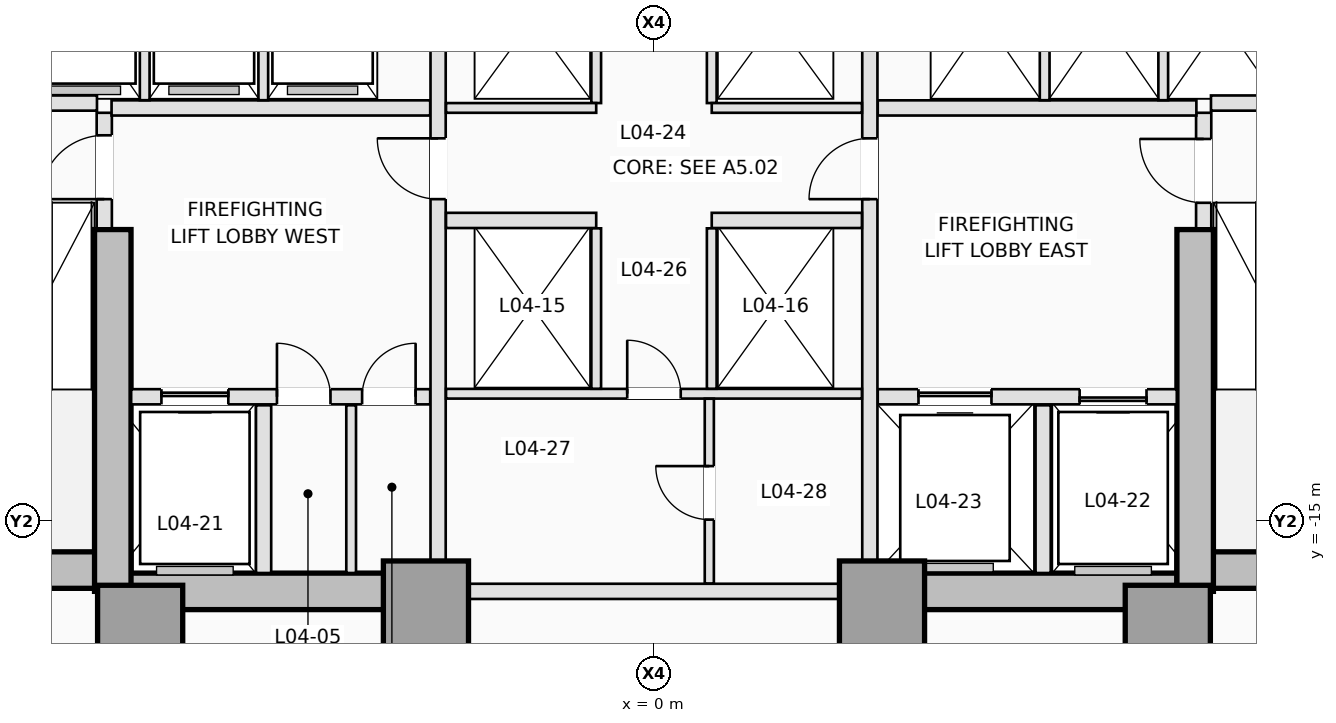
"""IFC4 building model, lengths in metres.
Left out: names, types, materials, properties, quantities, classifications, styles, units other than length and angle.
Written with IfcOpenShell. Run it as: python <this file> out.ifc"""

import sys

from ifc_helpers import new_model, si_unit, direction, frame, frame_2d, origin, origin_2d, place, context, subcontext, project, spatial, rectangle, extrude, element, fill, save


model = new_model("IFC4")
c1 = context("Model", 3, precision=1e-05, world=origin(), true_north=direction((0.0, 1.0)))
c2 = subcontext(c1, "Body", "Model", "MODEL_VIEW")
j1 = project(units=[si_unit("LENGTHUNIT", "METRE"), si_unit("PLANEANGLEUNIT", "RADIAN")], contexts=[c1])
p1 = place(None, origin())
s1 = spatial("IfcSite", under=j1, at=p1, CompositionType="ELEMENT")
p2 = place(p1, origin())
s2 = spatial("IfcBuilding", under=s1, at=p2, CompositionType="ELEMENT")
p3 = place(p2, frame((0.0, 0.0, 18.5)))
s3 = spatial("IfcBuildingStorey", under=s2, at=p3, CompositionType="ELEMENT", Elevation=18.5)
p4 = place(p3, frame((-12.8, -15.8, 0.0), z_axis=(0.0, 0.0, 1.0), x_axis=(1.0, 0.0, 0.0)))
e1 = element("IfcWall", 1, at=p4, inside=s3, PredefinedType="SHEAR", context=c2, shape_type="SweptSolid", body=[
    extrude(rectangle(XDim=4.2, YDim=0.6, at=frame_2d((2.1, 0.0))), origin(), (0.0, 0.0, 1.0), 4.5),
])
for number, where, z_axis, x_axis in (
    (2, (-8.9, -16.15, 0.0), (0.0, 0.0, 1.0), (1.0, 0.0, 0.0)),
    (3, (3.75, -16.15, 0.0), (0.0, 0.0, 1.0), (1.0, 0.0, 0.0)),
):
    element("IfcWall", number, at=place(p3, frame(where, z_axis=z_axis, x_axis=x_axis)), inside=s3, PredefinedType="SHEAR", context=c2, shape_type="SweptSolid", body=[
        extrude(rectangle(XDim=5.15, YDim=0.6, at=frame_2d((2.575, 0.0))), origin(), (0.0, 0.0, 1.0), 4.5),
    ])
p5 = place(p3, frame((8.6, -15.8, 0.0), z_axis=(0.0, 0.0, 1.0), x_axis=(1.0, 0.0, 0.0)))
e4 = element("IfcWall", 4, at=p5, inside=s3, PredefinedType="SHEAR", context=c2, shape_type="SweptSolid", body=[
    extrude(rectangle(XDim=4.2, YDim=0.6, at=frame_2d((2.1, 0.0))), origin(), (0.0, 0.0, 1.0), 4.5),
])
for number, where, z_axis, x_axis in (
    (5, (-8.9, -16.15, 0.0), (0.0, 0.0, 1.0), (0.0, 1.0, 0.0)),
    (6, (8.9, -16.15, 0.0), (0.0, 0.0, 1.0), (0.0, 1.0, 0.0)),
):
    element("IfcWall", number, at=place(p3, frame(where, z_axis=z_axis, x_axis=x_axis)), inside=s3, PredefinedType="SHEAR", context=c2, shape_type="SweptSolid", body=[
        extrude(rectangle(XDim=5.95, YDim=0.6, at=frame_2d((2.975, 0.0))), origin(), (0.0, 0.0, 1.0), 4.5),
    ])
for number, where, z_axis, x_axis in (
    (7, (-8.45, -16.75, 0.0), (0.0, 0.0, 1.0), (1.0, 0.0, 0.0)),
    (8, (-3.75, -16.35, 0.0), (0.0, 0.0, 1.0), (1.0, 0.0, 0.0)),
    (9, (3.75, -16.35, 0.0), (0.0, 0.0, 1.0), (1.0, 0.0, 0.0)),
    (10, (8.45, -16.75, 0.0), (0.0, 0.0, 1.0), (1.0, 0.0, 0.0)),
):
    element("IfcColumn", number, at=place(p3, frame(where, z_axis=z_axis, x_axis=x_axis)), inside=s3, PredefinedType="COLUMN", context=c2, shape_type="SweptSolid", body=[
        extrude(rectangle(XDim=1.4, YDim=1.4, at=origin_2d()), origin(), (0.0, 0.0, 1.0), 4.5),
    ])
p6 = place(p3, frame((-9.04, -10.18, 0.0), z_axis=(0.0, 0.0, 1.0), x_axis=(0.0, 1.0, 0.0)))
e11 = element("IfcWall", 11, at=p6, inside=s3, PredefinedType="PARTITIONING", context=c2, shape_type="SweptSolid", body=[
    extrude(rectangle(XDim=1.9, YDim=0.25, at=frame_2d((0.95, 0.0))), origin(), (0.0, 0.0, 1.0), 4.08),
])
p7 = place(p6, frame((0.48, 0.0, 0.0)))
e12 = element("IfcOpeningElement", 12, at=p7, cuts=e11, PredefinedType="OPENING", context=c2, shape_type="SweptSolid", body=[
    extrude(rectangle(XDim=1.05, YDim=2.15, at=frame_2d((0.525, 1.075))), frame((0.0, 0.135, 0.0), z_axis=(0.0, -1.0, 0.0), x_axis=(1.0, 0.0, 0.0)), (0.0, 0.0, 1.0), 0.27),
])
p8 = place(p3, frame((9.04, -10.18, 0.0), z_axis=(0.0, 0.0, 1.0), x_axis=(0.0, 1.0, 0.0)))
e13 = element("IfcWall", 13, at=p8, inside=s3, PredefinedType="PARTITIONING", context=c2, shape_type="SweptSolid", body=[
    extrude(rectangle(XDim=1.9, YDim=0.25, at=frame_2d((0.95, 0.0))), origin(), (0.0, 0.0, 1.0), 4.08),
])
p9 = place(p8, frame((0.42, 0.0, 0.0)))
e14 = element("IfcOpeningElement", 14, at=p9, cuts=e13, PredefinedType="OPENING", context=c2, shape_type="SweptSolid", body=[
    extrude(rectangle(XDim=1.05, YDim=2.15, at=frame_2d((0.525, 1.075))), frame((0.0, 0.135, 0.0), z_axis=(0.0, -1.0, 0.0), x_axis=(1.0, 0.0, 0.0)), (0.0, 0.0, 1.0), 0.27),
])
for number, where, z_axis, x_axis in (
    (15, (-12.38, -8.12, 0.0), (0.0, 0.0, 1.0), (1.0, 0.0, 0.0)),
    (16, (9.16, -8.12, 0.0), (0.0, 0.0, 1.0), (1.0, 0.0, 0.0)),
):
    element("IfcWall", number, at=place(p3, frame(where, z_axis=z_axis, x_axis=x_axis)), inside=s3, PredefinedType="PARTITIONING", context=c2, shape_type="SweptSolid", body=[
        extrude(rectangle(XDim=3.22, YDim=0.25, at=frame_2d((1.61, 0.0))), origin(), (0.0, 0.0, 1.0), 4.08),
    ])
p10 = place(p3, frame((-8.598, -12.95, 0.0), z_axis=(0.0, 0.0, 1.0), x_axis=(1.0, 0.0, 0.0)))
e17 = element("IfcWall", 17, at=p10, inside=s3, PredefinedType="PARTITIONING", context=c2, shape_type="SweptSolid", body=[
    extrude(rectangle(XDim=4.918, YDim=0.25, at=frame_2d((2.459, 0.0))), origin(), (0.0, 0.0, 1.0), 4.08),
])
p11 = place(p10, frame((0.498, 0.0, 0.0)))
e18 = element("IfcOpeningElement", 18, at=p11, cuts=e17, PredefinedType="OPENING", context=c2, shape_type="SweptSolid", body=[
    extrude(rectangle(XDim=1.1, YDim=2.15, at=frame_2d((0.55, 1.075))), frame((0.0, 0.135, 0.0), z_axis=(0.0, -1.0, 0.0), x_axis=(1.0, 0.0, 0.0)), (0.0, 0.0, 1.0), 0.27),
])
p12 = place(p10, frame((2.398, 0.0, 0.0)))
e19 = element("IfcOpeningElement", 19, at=p12, cuts=e17, PredefinedType="OPENING", context=c2, shape_type="SweptSolid", body=[
    extrude(rectangle(XDim=0.88, YDim=2.1, at=frame_2d((0.44, 1.05))), frame((0.0, 0.135, 0.0), z_axis=(0.0, -1.0, 0.0), x_axis=(1.0, 0.0, 0.0)), (0.0, 0.0, 1.0), 0.27),
])
p13 = place(p10, frame((3.798, 0.0, 0.0)))
e20 = element("IfcOpeningElement", 20, at=p13, cuts=e17, PredefinedType="OPENING", context=c2, shape_type="SweptSolid", body=[
    extrude(rectangle(XDim=0.88, YDim=2.1, at=frame_2d((0.44, 1.05))), frame((0.0, 0.135, 0.0), z_axis=(0.0, -1.0, 0.0), x_axis=(1.0, 0.0, 0.0)), (0.0, 0.0, 1.0), 0.27),
])
p14 = place(p3, frame((3.68, -12.95, 0.0), z_axis=(0.0, 0.0, 1.0), x_axis=(1.0, 0.0, 0.0)))
e21 = element("IfcWall", 21, at=p14, inside=s3, PredefinedType="PARTITIONING", context=c2, shape_type="SweptSolid", body=[
    extrude(rectangle(XDim=4.918, YDim=0.25, at=frame_2d((2.459, 0.0))), origin(), (0.0, 0.0, 1.0), 4.08),
])
p15 = place(p14, frame((3.32, 0.0, 0.0)))
e22 = element("IfcOpeningElement", 22, at=p15, cuts=e21, PredefinedType="OPENING", context=c2, shape_type="SweptSolid", body=[
    extrude(rectangle(XDim=1.1, YDim=2.15, at=frame_2d((0.55, 1.075))), frame((0.0, 0.135, 0.0), z_axis=(0.0, -1.0, 0.0), x_axis=(1.0, 0.0, 0.0)), (0.0, 0.0, 1.0), 0.27),
])
p16 = place(p14, frame((0.67, 0.0, 0.0)))
e23 = element("IfcOpeningElement", 23, at=p16, cuts=e21, PredefinedType="OPENING", context=c2, shape_type="SweptSolid", body=[
    extrude(rectangle(XDim=1.2, YDim=2.15, at=frame_2d((0.6, 1.075))), frame((0.0, 0.135, 0.0), z_axis=(0.0, -1.0, 0.0), x_axis=(1.0, 0.0, 0.0)), (0.0, 0.0, 1.0), 0.27),
])
p17 = place(p3, frame((-6.42, -15.848, 0.0), z_axis=(0.0, 0.0, 1.0), x_axis=(0.0, 1.0, 0.0)))
e24 = element("IfcWall", 24, at=p17, inside=s3, PredefinedType="PARTITIONING", context=c2, shape_type="SweptSolid", body=[
    extrude(rectangle(XDim=2.758, YDim=0.25, at=frame_2d((1.379, 0.0))), origin(), (0.0, 0.0, 1.0), 4.08),
])
p18 = place(p3, frame((-4.98, -15.848, 0.0), z_axis=(0.0, 0.0, 1.0), x_axis=(0.0, 1.0, 0.0)))
e25 = element("IfcWall", 25, at=p18, inside=s3, PredefinedType="PARTITIONING", context=c2, shape_type="SweptSolid", body=[
    extrude(rectangle(XDim=2.758, YDim=0.16, at=frame_2d((1.379, 0.0))), origin(), (0.0, 0.0, 1.0), 4.08),
])
p19 = place(p3, frame((6.4, -15.848, 0.0), z_axis=(0.0, 0.0, 1.0), x_axis=(0.0, 1.0, 0.0)))
e26 = element("IfcWall", 26, at=p19, inside=s3, PredefinedType="PARTITIONING", context=c2, shape_type="SweptSolid", body=[
    extrude(rectangle(XDim=2.758, YDim=0.25, at=frame_2d((1.379, 0.0))), origin(), (0.0, 0.0, 1.0), 4.08),
])
for number, where, z_axis, x_axis in (
    (27, (-8.92, -8.2, 0.0), (0.0, 0.0, 1.0), (1.0, 0.0, 0.0)),
    (28, (3.68, -8.2, 0.0), (0.0, 0.0, 1.0), (1.0, 0.0, 0.0)),
):
    element("IfcWall", number, at=place(p3, frame(where, z_axis=z_axis, x_axis=x_axis)), inside=s3, PredefinedType="PARTITIONING", context=c2, shape_type="SweptSolid", body=[
        extrude(rectangle(XDim=5.24, YDim=0.25, at=frame_2d((2.62, 0.0))), origin(), (0.0, 0.0, 1.0), 4.08),
    ])
p20 = place(p3, frame((-3.55, -15.648, 0.0), z_axis=(0.0, 0.0, 1.0), x_axis=(0.0, 1.0, 0.0)))
e29 = element("IfcWall", 29, at=p20, inside=s3, PredefinedType="PARTITIONING", context=c2, shape_type="SweptSolid", body=[
    extrude(rectangle(XDim=10.146, YDim=0.25, at=frame_2d((5.073, 0.0))), origin(), (0.0, 0.0, 1.0), 4.08),
])
p21 = place(p20, frame((5.948, 0.0, 0.0)))
e30 = element("IfcOpeningElement", 30, at=p21, cuts=e29, PredefinedType="OPENING", context=c2, shape_type="SweptSolid", body=[
    extrude(rectangle(XDim=1.0, YDim=2.15, at=frame_2d((0.5, 1.075))), frame((0.0, 0.135, 0.0), z_axis=(0.0, -1.0, 0.0), x_axis=(1.0, 0.0, 0.0)), (0.0, 0.0, 1.0), 0.27),
])
p22 = place(p3, frame((3.55, -15.648, 0.0), z_axis=(0.0, 0.0, 1.0), x_axis=(0.0, 1.0, 0.0)))
e31 = element("IfcWall", 31, at=p22, inside=s3, PredefinedType="PARTITIONING", context=c2, shape_type="SweptSolid", body=[
    extrude(rectangle(XDim=10.146, YDim=0.25, at=frame_2d((5.073, 0.0))), origin(), (0.0, 0.0, 1.0), 4.08),
])
p23 = place(p22, frame((5.948, 0.0, 0.0)))
e32 = element("IfcOpeningElement", 32, at=p23, cuts=e31, PredefinedType="OPENING", context=c2, shape_type="SweptSolid", body=[
    extrude(rectangle(XDim=1.0, YDim=2.15, at=frame_2d((0.5, 1.075))), frame((0.0, 0.135, 0.0), z_axis=(0.0, -1.0, 0.0), x_axis=(1.0, 0.0, 0.0)), (0.0, 0.0, 1.0), 0.27),
])
for number, where, z_axis, x_axis in (
    (33, (-8.375, -8.073, 0.0), (0.0, 0.0, 1.0), (0.0, 1.0, 0.0)),
    (34, (-6.425, -8.073, 0.0), (0.0, 0.0, 1.0), (0.0, 1.0, 0.0)),
    (35, (6.425, -8.073, 0.0), (0.0, 0.0, 1.0), (0.0, 1.0, 0.0)),
    (36, (8.375, -8.073, 0.0), (0.0, 0.0, 1.0), (0.0, 1.0, 0.0)),
):
    element("IfcWall", number, at=place(p3, frame(where, z_axis=z_axis, x_axis=x_axis)), inside=s3, PredefinedType="PARTITIONING", context=c2, shape_type="SweptSolid", body=[
        extrude(rectangle(XDim=2.733, YDim=0.16, at=frame_2d((1.366, 0.0))), origin(), (0.0, 0.0, 1.0), 4.08),
    ])
p24 = place(p3, frame((-3.048, -16.15, 0.0), z_axis=(0.0, 0.0, 1.0), x_axis=(1.0, 0.0, 0.0)))
e37 = element("IfcWall", 37, at=p24, inside=s3, PredefinedType="PARTITIONING", context=c2, shape_type="SweptSolid", body=[
    extrude(rectangle(XDim=6.096, YDim=0.25, at=frame_2d((3.048, 0.0))), origin(), (0.0, 0.0, 1.0), 3.056),
])
for number, where, z_axis, x_axis in (
    (38, (-0.95, -8.12, 0.0), (0.0, 0.0, 1.0), (0.0, 1.0, 0.0)),
    (39, (0.95, -8.12, 0.0), (0.0, 0.0, 1.0), (0.0, 1.0, 0.0)),
):
    element("IfcWall", number, at=place(p3, frame(where, z_axis=z_axis, x_axis=x_axis)), inside=s3, PredefinedType="PARTITIONING", context=c2, shape_type="SweptSolid", body=[
        extrude(rectangle(XDim=2.78, YDim=0.16, at=frame_2d((1.39, 0.0))), origin(), (0.0, 0.0, 1.0), 4.08),
    ])
for number, where, z_axis, x_axis in (
    (40, (-3.42, -8.2, 0.0), (0.0, 0.0, 1.0), (1.0, 0.0, 0.0)),
    (41, (0.95, -8.2, 0.0), (0.0, 0.0, 1.0), (1.0, 0.0, 0.0)),
):
    element("IfcWall", number, at=place(p3, frame(where, z_axis=z_axis, x_axis=x_axis)), inside=s3, PredefinedType="PARTITIONING", context=c2, shape_type="SweptSolid", body=[
        extrude(rectangle(XDim=2.47, YDim=0.16, at=frame_2d((1.235, 0.0))), origin(), (0.0, 0.0, 1.0), 4.08),
    ])
for number, where, z_axis, x_axis in (
    (42, (-3.42, -10.05, 0.0), (0.0, 0.0, 1.0), (1.0, 0.0, 0.0)),
    (43, (0.95, -10.05, 0.0), (0.0, 0.0, 1.0), (1.0, 0.0, 0.0)),
):
    element("IfcWall", number, at=place(p3, frame(where, z_axis=z_axis, x_axis=x_axis)), inside=s3, PredefinedType="PARTITIONING", context=c2, shape_type="SweptSolid", body=[
        extrude(rectangle(XDim=2.47, YDim=0.25, at=frame_2d((1.235, 0.0))), origin(), (0.0, 0.0, 1.0), 4.08),
    ])
p25 = place(p3, frame((-3.42, -12.9, 0.0), z_axis=(0.0, 0.0, 1.0), x_axis=(1.0, 0.0, 0.0)))
e44 = element("IfcWall", 44, at=p25, inside=s3, PredefinedType="PARTITIONING", context=c2, shape_type="SweptSolid", body=[
    extrude(rectangle(XDim=6.84, YDim=0.16, at=frame_2d((3.42, 0.0))), origin(), (0.0, 0.0, 1.0), 4.08),
])
p26 = place(p25, frame((2.98, 0.0, 0.0)))
e45 = element("IfcOpeningElement", 45, at=p26, cuts=e44, PredefinedType="OPENING", context=c2, shape_type="SweptSolid", body=[
    extrude(rectangle(XDim=0.88, YDim=2.12, at=frame_2d((0.44, 1.06))), frame((0.0, 0.09, 0.0), z_axis=(0.0, -1.0, 0.0), x_axis=(1.0, 0.0, 0.0)), (0.0, 0.0, 1.0), 0.18),
])
for number, where, z_axis, x_axis in (
    (46, (-0.95, -12.818, 0.0), (0.0, 0.0, 1.0), (0.0, 1.0, 0.0)),
    (47, (0.95, -12.818, 0.0), (0.0, 0.0, 1.0), (0.0, 1.0, 0.0)),
):
    element("IfcWall", number, at=place(p3, frame(where, z_axis=z_axis, x_axis=x_axis)), inside=s3, PredefinedType="PARTITIONING", context=c2, shape_type="SweptSolid", body=[
        extrude(rectangle(XDim=2.638, YDim=0.16, at=frame_2d((1.319, 0.0))), origin(), (0.0, 0.0, 1.0), 4.08),
    ])
p27 = place(p3, frame((0.91, -16.02, 0.0), z_axis=(0.0, 0.0, 1.0), x_axis=(0.0, 1.0, 0.0)))
e48 = element("IfcWall", 48, at=p27, inside=s3, PredefinedType="PARTITIONING", context=c2, shape_type="SweptSolid", body=[
    extrude(rectangle(XDim=3.038, YDim=0.15, at=frame_2d((1.519, 0.0))), origin(), (0.0, 0.0, 1.0), 4.08),
])
p28 = place(p27, frame((1.05, 0.0, 0.0)))
e49 = element("IfcOpeningElement", 49, at=p28, cuts=e48, PredefinedType="OPENING", context=c2, shape_type="SweptSolid", body=[
    extrude(rectangle(XDim=0.88, YDim=2.12, at=frame_2d((0.44, 1.06))), frame((0.0, 0.085, 0.0), z_axis=(0.0, -1.0, 0.0), x_axis=(1.0, 0.0, 0.0)), (0.0, 0.0, 1.0), 0.17),
])
p29 = place(p11, origin())
e50 = element("IfcDoor", 50, at=p29, inside=s3, OperationType="SLIDING_TO_LEFT", PredefinedType="DOOR", context=c2, shape_type="SweptSolid", body=[
    extrude(rectangle(XDim=1.1, YDim=2.15, at=frame_2d((0.55, 1.075))), frame((0.0, 0.025, 0.0), z_axis=(0.0, -1.0, 0.0), x_axis=(1.0, 0.0, 0.0)), (0.0, 0.0, 1.0), 0.05),
])
fill(e18, e50)
p30 = place(p15, origin())
e51 = element("IfcDoor", 51, at=p30, inside=s3, OperationType="SLIDING_TO_RIGHT", PredefinedType="DOOR", context=c2, shape_type="SweptSolid", body=[
    extrude(rectangle(XDim=1.1, YDim=2.15, at=frame_2d((0.55, 1.075))), frame((0.0, 0.025, 0.0), z_axis=(0.0, -1.0, 0.0), x_axis=(1.0, 0.0, 0.0)), (0.0, 0.0, 1.0), 0.05),
])
fill(e22, e51)
p31 = place(p16, origin())
e52 = element("IfcDoor", 52, at=p31, inside=s3, OperationType="SLIDING_TO_LEFT", PredefinedType="DOOR", context=c2, shape_type="SweptSolid", body=[
    extrude(rectangle(XDim=1.2, YDim=2.15, at=frame_2d((0.6, 1.075))), frame((0.0, 0.025, 0.0), z_axis=(0.0, -1.0, 0.0), x_axis=(1.0, 0.0, 0.0)), (0.0, 0.0, 1.0), 0.05),
])
fill(e23, e52)
p32 = place(p7, origin())
e53 = element("IfcDoor", 53, at=p32, inside=s3, OperationType="SINGLE_SWING_LEFT", PredefinedType="DOOR", context=c2, shape_type="SweptSolid", body=[
    extrude(rectangle(XDim=1.05, YDim=2.15, at=frame_2d((0.525, 1.075))), frame((0.0, 0.025, 0.0), z_axis=(0.0, -1.0, 0.0), x_axis=(1.0, 0.0, 0.0)), (0.0, 0.0, 1.0), 0.05),
])
fill(e12, e53)
p33 = place(p9, origin())
e54 = element("IfcDoor", 54, at=p33, inside=s3, OperationType="SINGLE_SWING_RIGHT", PredefinedType="DOOR", context=c2, shape_type="SweptSolid", body=[
    extrude(rectangle(XDim=1.05, YDim=2.15, at=frame_2d((0.525, 1.075))), frame((0.0, 0.025, 0.0), z_axis=(0.0, -1.0, 0.0), x_axis=(1.0, 0.0, 0.0)), (0.0, 0.0, 1.0), 0.05),
])
fill(e14, e54)
p34 = place(p12, origin())
e55 = element("IfcDoor", 55, at=p34, inside=s3, OperationType="SINGLE_SWING_LEFT", PredefinedType="TRAPDOOR", context=c2, shape_type="SweptSolid", body=[
    extrude(rectangle(XDim=0.88, YDim=2.1, at=frame_2d((0.44, 1.05))), frame((0.0, 0.025, 0.0), z_axis=(0.0, -1.0, 0.0), x_axis=(1.0, 0.0, 0.0)), (0.0, 0.0, 1.0), 0.05),
])
fill(e19, e55)
p35 = place(p13, origin())
e56 = element("IfcDoor", 56, at=p35, inside=s3, OperationType="SINGLE_SWING_RIGHT", PredefinedType="TRAPDOOR", context=c2, shape_type="SweptSolid", body=[
    extrude(rectangle(XDim=0.88, YDim=2.1, at=frame_2d((0.44, 1.05))), frame((0.0, 0.025, 0.0), z_axis=(0.0, -1.0, 0.0), x_axis=(1.0, 0.0, 0.0)), (0.0, 0.0, 1.0), 0.05),
])
fill(e20, e56)
p36 = place(p21, origin())
e57 = element("IfcDoor", 57, at=p36, inside=s3, OperationType="SINGLE_SWING_RIGHT", PredefinedType="DOOR", context=c2, shape_type="SweptSolid", body=[
    extrude(rectangle(XDim=1.0, YDim=2.15, at=frame_2d((0.5, 1.075))), frame((0.0, 0.025, 0.0), z_axis=(0.0, -1.0, 0.0), x_axis=(1.0, 0.0, 0.0)), (0.0, 0.0, 1.0), 0.05),
])
fill(e30, e57)
p37 = place(p23, origin())
e58 = element("IfcDoor", 58, at=p37, inside=s3, OperationType="SINGLE_SWING_LEFT", PredefinedType="DOOR", context=c2, shape_type="SweptSolid", body=[
    extrude(rectangle(XDim=1.0, YDim=2.15, at=frame_2d((0.5, 1.075))), frame((0.0, 0.025, 0.0), z_axis=(0.0, -1.0, 0.0), x_axis=(1.0, 0.0, 0.0)), (0.0, 0.0, 1.0), 0.05),
])
fill(e32, e58)
p38 = place(p26, origin())
e59 = element("IfcDoor", 59, at=p38, inside=s3, OperationType="SINGLE_SWING_LEFT", PredefinedType="DOOR", context=c2, shape_type="SweptSolid", body=[
    extrude(rectangle(XDim=0.88, YDim=2.12, at=frame_2d((0.44, 1.06))), frame((0.0, 0.025, 0.0), z_axis=(0.0, -1.0, 0.0), x_axis=(1.0, 0.0, 0.0)), (0.0, 0.0, 1.0), 0.05),
])
fill(e45, e59)
p39 = place(p28, origin())
e60 = element("IfcDoor", 60, at=p39, inside=s3, OperationType="SINGLE_SWING_RIGHT", PredefinedType="DOOR", context=c2, shape_type="SweptSolid", body=[
    extrude(rectangle(XDim=0.88, YDim=2.12, at=frame_2d((0.44, 1.06))), frame((0.0, 0.025, 0.0), z_axis=(0.0, -1.0, 0.0), x_axis=(1.0, 0.0, 0.0)), (0.0, 0.0, 1.0), 0.05),
])
fill(e49, e60)
save(model, sys.argv[1])
